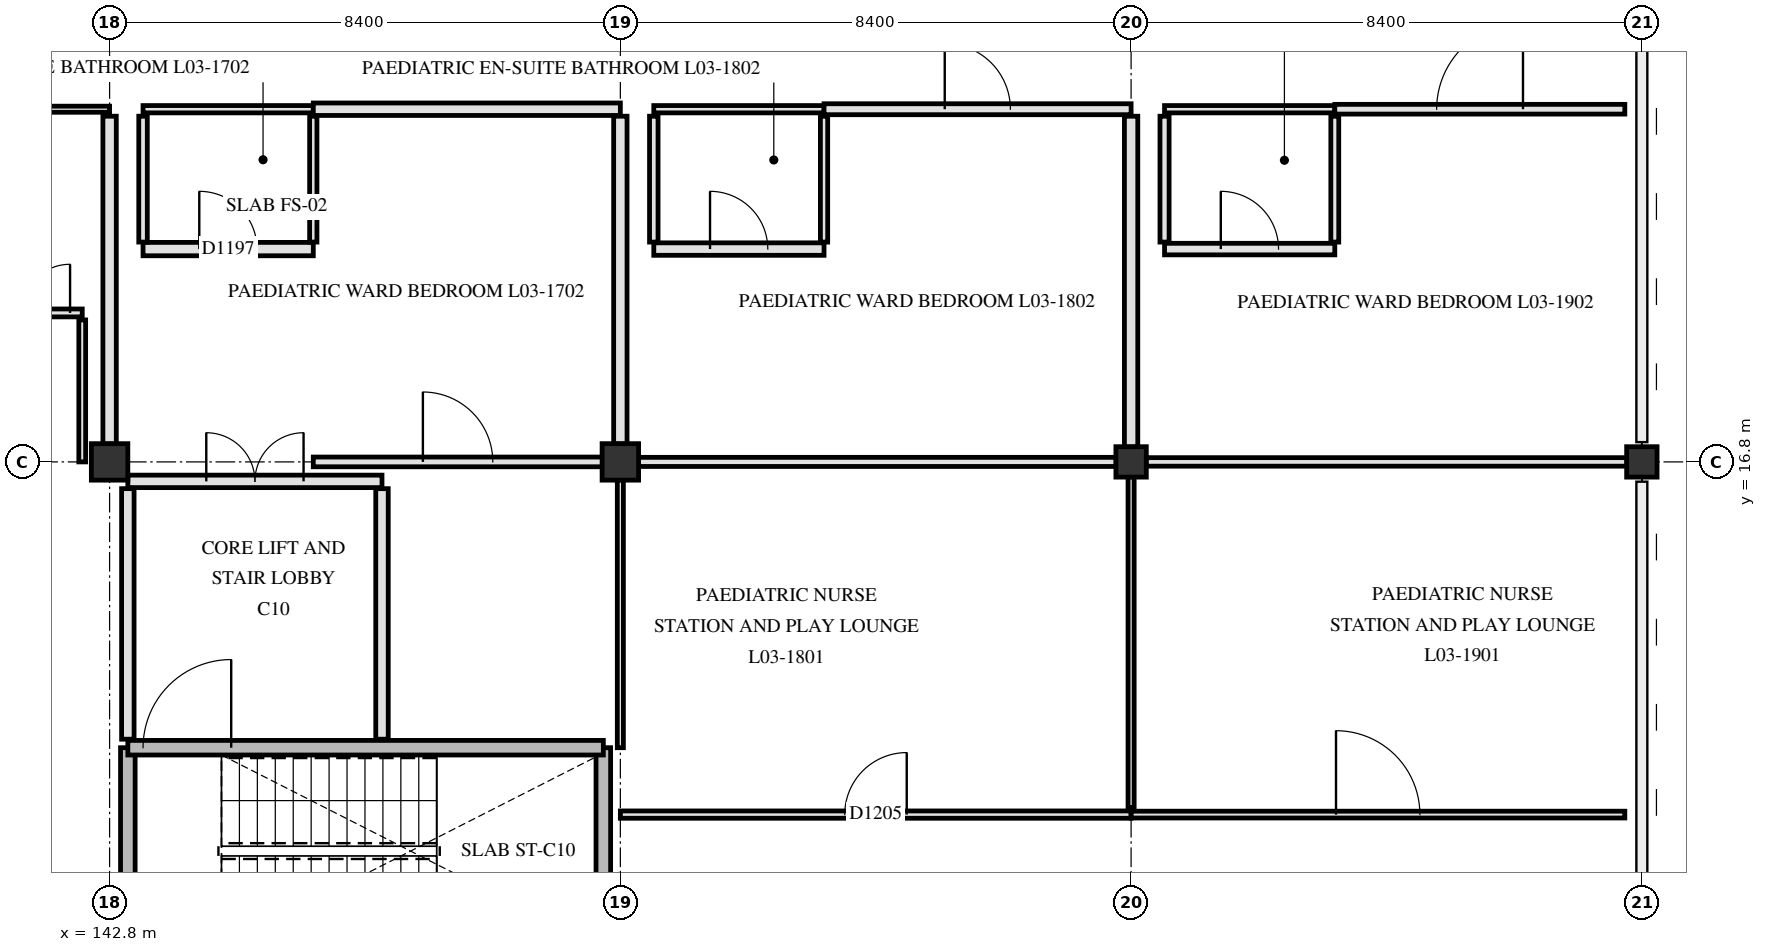
"""IFC4 building model, lengths in metres.
Left out: names, types, materials, properties, quantities, classifications, styles, units other than length and angle.
Written with IfcOpenShell. Run it as: python <this file> out.ifc"""

import sys

from ifc_helpers import new_model, si_unit, direction, frame, frame_2d, origin, origin_2d, place, context, subcontext, project, spatial, rectangle, extrude, element, fill, save


model = new_model("IFC4")
c1 = context("Model", 3, precision=1e-05, world=origin(), true_north=direction((0.0, 1.0)))
c2 = subcontext(c1, "Body", "Model", "MODEL_VIEW")
j1 = project(units=[si_unit("LENGTHUNIT", "METRE"), si_unit("PLANEANGLEUNIT", "RADIAN")], contexts=[c1])
p1 = place(None, origin())
s1 = spatial("IfcSite", under=j1, at=p1, CompositionType="ELEMENT")
p2 = place(p1, origin())
s2 = spatial("IfcBuilding", under=s1, at=p2, CompositionType="ELEMENT")
p3 = place(p2, frame((0.0, 0.0, 14.4)))
s3 = spatial("IfcBuildingStorey", under=s2, at=p3, CompositionType="ELEMENT", Elevation=14.4)
for number, where, z_axis, x_axis in (
    (1, (142.8, 16.8, 0.0), (0.0, 0.0, 1.0), (1.0, 0.0, 0.0)),
    (2, (151.2, 16.8, 0.0), (0.0, 0.0, 1.0), (1.0, 0.0, 0.0)),
):
    element("IfcColumn", number, at=place(p3, frame(where, z_axis=z_axis, x_axis=x_axis)), inside=s3, PredefinedType="COLUMN", context=c2, shape_type="SweptSolid", body=[
        extrude(rectangle(XDim=0.6, YDim=0.6, at=origin_2d()), origin(), (0.0, 0.0, 1.0), 4.2),
    ])
for number, where, z_axis, x_axis in (
    (3, (159.6, 16.8, 0.0), (0.0, 0.0, 1.0), (1.0, 0.0, 0.0)),
    (4, (168.0, 16.8, 0.0), (0.0, 0.0, 1.0), (1.0, 0.0, 0.0)),
):
    element("IfcColumn", number, at=place(p3, frame(where, z_axis=z_axis, x_axis=x_axis)), inside=s3, PredefinedType="COLUMN", context=c2, shape_type="SweptSolid", body=[
        extrude(rectangle(XDim=0.5, YDim=0.5, at=origin_2d()), origin(), (0.0, 0.0, 1.0), 4.2),
    ])
for number, where, z_axis, x_axis in (
    (5, (143.1, 8.78, 0.0), (0.0, 0.0, 1.0), (0.0, 1.0, 0.0)),
    (6, (150.92, 8.78, 0.0), (0.0, 0.0, 1.0), (0.0, 1.0, 0.0)),
):
    element("IfcWall", number, at=place(p3, frame(where, z_axis=z_axis, x_axis=x_axis)), inside=s3, PredefinedType="SHEAR", context=c2, shape_type="SweptSolid", body=[
        extrude(rectangle(XDim=3.32, YDim=0.24, at=frame_2d((1.66, 0.0))), origin(), (0.0, 0.0, 1.0), 3.9),
    ])
p4 = place(p3, frame((143.1, 12.1, 0.0), z_axis=(0.0, 0.0, 1.0), x_axis=(1.0, 0.0, 0.0)))
e7 = element("IfcWall", 7, at=p4, inside=s3, PredefinedType="SHEAR", context=c2, shape_type="SweptSolid", body=[
    extrude(rectangle(XDim=7.82, YDim=0.24, at=frame_2d((3.91, 0.0))), origin(), (0.0, 0.0, 1.0), 3.9),
])
p5 = place(p4, frame((0.25, 0.0, 0.0)))
e8 = element("IfcOpeningElement", 8, at=p5, cuts=e7, PredefinedType="OPENING", context=c2, shape_type="SweptSolid", body=[
    extrude(rectangle(XDim=1.45, YDim=2.2, at=frame_2d((0.725, 1.1))), frame((0.0, 0.13, 0.0), z_axis=(0.0, -1.0, 0.0), x_axis=(1.0, 0.0, 0.0)), (0.0, 0.0, 1.0), 0.26),
])
p6 = place(p3, frame((147.28, 12.24, 0.0), z_axis=(0.0, 0.0, 1.0), x_axis=(0.0, 1.0, 0.0)))
e9 = element("IfcWall", 9, at=p6, inside=s3, PredefinedType="PARTITIONING", context=c2, shape_type="SweptSolid", body=[
    extrude(rectangle(XDim=4.12, YDim=0.205, at=frame_2d((2.06, 0.0))), origin(), (0.0, 0.0, 1.0), 3.89),
])
p7 = place(p3, frame((143.1, 12.24, 0.0), z_axis=(0.0, 0.0, 1.0), x_axis=(0.0, 1.0, 0.0)))
e10 = element("IfcWall", 10, at=p7, inside=s3, PredefinedType="PARTITIONING", context=c2, shape_type="SweptSolid", body=[
    extrude(rectangle(XDim=4.12, YDim=0.205, at=frame_2d((2.06, 0.0))), origin(), (0.0, 0.0, 1.0), 3.34),
])
p8 = place(p3, frame((143.1, 16.48, 0.0), z_axis=(0.0, 0.0, 1.0), x_axis=(1.0, 0.0, 0.0)))
e11 = element("IfcWall", 11, at=p8, inside=s3, PredefinedType="PARTITIONING", context=c2, shape_type="SweptSolid", body=[
    extrude(rectangle(XDim=4.18, YDim=0.205, at=frame_2d((2.09, 0.0))), origin(), (0.0, 0.0, 1.0), 3.29),
])
p9 = place(p8, frame((1.29, 0.0, 0.0)))
e12 = element("IfcOpeningElement", 12, at=p9, cuts=e11, PredefinedType="OPENING", context=c2, shape_type="SweptSolid", body=[
    extrude(rectangle(XDim=1.6, YDim=2.25, at=frame_2d((0.8, 1.125))), frame((0.0, 0.113, 0.0), z_axis=(0.0, -1.0, 0.0), x_axis=(1.0, 0.0, 0.0)), (0.0, 0.0, 1.0), 0.225),
])
p10 = place(p3, frame((151.2, 11.0, 0.0), z_axis=(0.0, 0.0, 1.0), x_axis=(1.0, 0.0, 0.0)))
e13 = element("IfcWall", 13, at=p10, inside=s3, PredefinedType="PARTITIONING", context=c2, shape_type="SweptSolid", body=[
    extrude(rectangle(XDim=8.4, YDim=0.12, at=frame_2d((4.2, 0.0))), origin(), (0.0, 0.0, 1.0), 3.34),
])
p11 = place(p10, frame((3.69, 0.0, 0.0)))
e14 = element("IfcOpeningElement", 14, at=p11, cuts=e13, PredefinedType="OPENING", context=c2, shape_type="SweptSolid", body=[
    extrude(rectangle(XDim=1.02, YDim=2.12, at=frame_2d((0.51, 1.06))), frame((0.0, 0.07, 0.0), z_axis=(0.0, -1.0, 0.0), x_axis=(1.0, 0.0, 0.0)), (0.0, 0.0, 1.0), 0.14),
])
p12 = place(p3, frame((159.6, 11.0, 0.0), z_axis=(0.0, 0.0, 1.0), x_axis=(1.0, 0.0, 0.0)))
e15 = element("IfcWall", 15, at=p12, inside=s3, PredefinedType="PARTITIONING", context=c2, shape_type="SweptSolid", body=[
    extrude(rectangle(XDim=8.12, YDim=0.112, at=frame_2d((4.06, 0.0))), origin(), (0.0, 0.0, 1.0), 2.89),
])
p13 = place(p12, frame((3.37, 0.0, 0.0)))
e16 = element("IfcOpeningElement", 16, at=p13, cuts=e15, PredefinedType="OPENING", context=c2, shape_type="SweptSolid", body=[
    extrude(rectangle(XDim=1.38, YDim=2.22, at=frame_2d((0.69, 1.11))), frame((0.0, 0.066, 0.0), z_axis=(0.0, -1.0, 0.0), x_axis=(1.0, 0.0, 0.0)), (0.0, 0.0, 1.0), 0.132),
])
p14 = place(p3, frame((146.15, 16.8, 0.0), z_axis=(0.0, 0.0, 1.0), x_axis=(1.0, 0.0, 0.0)))
e17 = element("IfcWall", 17, at=p14, inside=s3, PredefinedType="PARTITIONING", context=c2, shape_type="SweptSolid", body=[
    extrude(rectangle(XDim=4.755, YDim=0.16, at=frame_2d((2.377, 0.0))), origin(), (0.0, 0.0, 1.0), 3.29),
])
p15 = place(p14, frame((1.802, 0.0, 0.0)))
e18 = element("IfcOpeningElement", 18, at=p15, cuts=e17, PredefinedType="OPENING", context=c2, shape_type="SweptSolid", body=[
    extrude(rectangle(XDim=1.15, YDim=2.15, at=frame_2d((0.575, 1.075))), frame((0.0, 0.09, 0.0), z_axis=(0.0, -1.0, 0.0), x_axis=(1.0, 0.0, 0.0)), (0.0, 0.0, 1.0), 0.18),
])
p16 = place(p3, frame((151.495, 16.8, 0.0), z_axis=(0.0, 0.0, 1.0), x_axis=(1.0, 0.0, 0.0)))
e19 = element("IfcWall", 19, at=p16, inside=s3, PredefinedType="PARTITIONING", context=c2, shape_type="SweptSolid", body=[
    extrude(rectangle(XDim=7.86, YDim=0.15, at=frame_2d((3.93, 0.0))), origin(), (0.0, 0.0, 1.0), 3.29),
])
p17 = place(p3, frame((159.845, 16.8, 0.0), z_axis=(0.0, 0.0, 1.0), x_axis=(1.0, 0.0, 0.0)))
e20 = element("IfcWall", 20, at=p17, inside=s3, PredefinedType="PARTITIONING", context=c2, shape_type="SweptSolid", body=[
    extrude(rectangle(XDim=7.91, YDim=0.14, at=frame_2d((3.955, 0.0))), origin(), (0.0, 0.0, 1.0), 3.29),
])
p18 = place(p3, frame((140.35, 19.25, 0.0), z_axis=(0.0, 0.0, 1.0), x_axis=(1.0, 0.0, 0.0)))
e21 = element("IfcWall", 21, at=p18, inside=s3, PredefinedType="PARTITIONING", context=c2, shape_type="SweptSolid", body=[
    extrude(rectangle(XDim=2.0, YDim=0.13, at=frame_2d((1.0, 0.0))), origin(), (0.0, 0.0, 1.0), 3.89),
])
p19 = place(p18, frame((0.2, 0.0, 0.0)))
e22 = element("IfcOpeningElement", 22, at=p19, cuts=e21, PredefinedType="OPENING", context=c2, shape_type="SweptSolid", body=[
    extrude(rectangle(XDim=1.6, YDim=2.25, at=frame_2d((0.8, 1.125))), frame((0.0, 0.075, 0.0), z_axis=(0.0, -1.0, 0.0), x_axis=(1.0, 0.0, 0.0)), (0.0, 0.0, 1.0), 0.15),
])
p20 = place(p3, frame((143.35, 20.3, 0.0), z_axis=(0.0, 0.0, 1.0), x_axis=(1.0, 0.0, 0.0)))
e23 = element("IfcWall", 23, at=p20, inside=s3, PredefinedType="PARTITIONING", context=c2, shape_type="SweptSolid", body=[
    extrude(rectangle(XDim=2.8, YDim=0.22, at=frame_2d((1.4, 0.0))), origin(), (0.0, 0.0, 1.0), 3.89),
])
p21 = place(p20, frame((0.925, 0.0, 0.0)))
e24 = element("IfcOpeningElement", 24, at=p21, cuts=e23, PredefinedType="OPENING", context=c2, shape_type="SweptSolid", body=[
    extrude(rectangle(XDim=0.95, YDim=2.1, at=frame_2d((0.475, 1.05))), frame((0.0, 0.12, 0.0), z_axis=(0.0, -1.0, 0.0), x_axis=(1.0, 0.0, 0.0)), (0.0, 0.0, 1.0), 0.24),
])
p22 = place(p3, frame((151.75, 20.3, 0.0), z_axis=(0.0, 0.0, 1.0), x_axis=(1.0, 0.0, 0.0)))
e25 = element("IfcWall", 25, at=p22, inside=s3, PredefinedType="PARTITIONING", context=c2, shape_type="SweptSolid", body=[
    extrude(rectangle(XDim=2.8, YDim=0.205, at=frame_2d((1.4, 0.0))), origin(), (0.0, 0.0, 1.0), 3.89),
])
p23 = place(p22, frame((0.925, 0.0, 0.0)))
e26 = element("IfcOpeningElement", 26, at=p23, cuts=e25, PredefinedType="OPENING", context=c2, shape_type="SweptSolid", body=[
    extrude(rectangle(XDim=0.95, YDim=2.1, at=frame_2d((0.475, 1.05))), frame((0.0, 0.113, 0.0), z_axis=(0.0, -1.0, 0.0), x_axis=(1.0, 0.0, 0.0)), (0.0, 0.0, 1.0), 0.225),
])
p24 = place(p3, frame((160.15, 20.3, 0.0), z_axis=(0.0, 0.0, 1.0), x_axis=(1.0, 0.0, 0.0)))
e27 = element("IfcWall", 27, at=p24, inside=s3, PredefinedType="PARTITIONING", context=c2, shape_type="SweptSolid", body=[
    extrude(rectangle(XDim=2.8, YDim=0.19, at=frame_2d((1.4, 0.0))), origin(), (0.0, 0.0, 1.0), 3.89),
])
p25 = place(p24, frame((0.925, 0.0, 0.0)))
e28 = element("IfcOpeningElement", 28, at=p25, cuts=e27, PredefinedType="OPENING", context=c2, shape_type="SweptSolid", body=[
    extrude(rectangle(XDim=0.95, YDim=2.1, at=frame_2d((0.475, 1.05))), frame((0.0, 0.105, 0.0), z_axis=(0.0, -1.0, 0.0), x_axis=(1.0, 0.0, 0.0)), (0.0, 0.0, 1.0), 0.21),
])
p26 = place(p3, frame((137.75, 22.6, 0.0), z_axis=(0.0, 0.0, 1.0), x_axis=(1.0, 0.0, 0.0)))
e29 = element("IfcWall", 29, at=p26, inside=s3, PredefinedType="PARTITIONING", context=c2, shape_type="SweptSolid", body=[
    extrude(rectangle(XDim=5.05, YDim=0.1, at=frame_2d((2.525, 0.0))), origin(), (0.0, 0.0, 1.0), 3.34),
])
p27 = place(p3, frame((143.35, 22.6, 0.0), z_axis=(0.0, 0.0, 1.0), x_axis=(1.0, 0.0, 0.0)))
e30 = element("IfcWall", 30, at=p27, inside=s3, PredefinedType="PARTITIONING", context=c2, shape_type="SweptSolid", body=[
    extrude(rectangle(XDim=2.8, YDim=0.12, at=frame_2d((1.4, 0.0))), origin(), (0.0, 0.0, 1.0), 3.89),
])
p28 = place(p3, frame((146.15, 22.6, 0.0), z_axis=(0.0, 0.0, 1.0), x_axis=(1.0, 0.0, 0.0)))
e31 = element("IfcWall", 31, at=p28, inside=s3, PredefinedType="PARTITIONING", context=c2, shape_type="SweptSolid", body=[
    extrude(rectangle(XDim=5.05, YDim=0.205, at=frame_2d((2.525, 0.0))), origin(), (0.0, 0.0, 1.0), 3.34),
])
p29 = place(p3, frame((151.75, 22.6, 0.0), z_axis=(0.0, 0.0, 1.0), x_axis=(1.0, 0.0, 0.0)))
e32 = element("IfcWall", 32, at=p29, inside=s3, PredefinedType="PARTITIONING", context=c2, shape_type="SweptSolid", body=[
    extrude(rectangle(XDim=2.8, YDim=0.12, at=frame_2d((1.4, 0.0))), origin(), (0.0, 0.0, 1.0), 3.89),
])
p30 = place(p3, frame((154.55, 22.6, 0.0), z_axis=(0.0, 0.0, 1.0), x_axis=(1.0, 0.0, 0.0)))
e33 = element("IfcWall", 33, at=p30, inside=s3, PredefinedType="PARTITIONING", context=c2, shape_type="SweptSolid", body=[
    extrude(rectangle(XDim=5.05, YDim=0.18, at=frame_2d((2.525, 0.0))), origin(), (0.0, 0.0, 1.0), 3.34),
])
p31 = place(p30, frame((1.985, 0.0, 0.0)))
e34 = element("IfcOpeningElement", 34, at=p31, cuts=e33, PredefinedType="OPENING", context=c2, shape_type="SweptSolid", body=[
    extrude(rectangle(XDim=1.08, YDim=2.12, at=frame_2d((0.54, 1.06))), frame((0.0, 0.1, 0.0), z_axis=(0.0, -1.0, 0.0), x_axis=(1.0, 0.0, 0.0)), (0.0, 0.0, 1.0), 0.2),
])
p32 = place(p3, frame((160.15, 22.6, 0.0), z_axis=(0.0, 0.0, 1.0), x_axis=(1.0, 0.0, 0.0)))
e35 = element("IfcWall", 35, at=p32, inside=s3, PredefinedType="PARTITIONING", context=c2, shape_type="SweptSolid", body=[
    extrude(rectangle(XDim=2.8, YDim=0.12, at=frame_2d((1.4, 0.0))), origin(), (0.0, 0.0, 1.0), 3.89),
])
p33 = place(p3, frame((162.95, 22.6, 0.0), z_axis=(0.0, 0.0, 1.0), x_axis=(1.0, 0.0, 0.0)))
e36 = element("IfcWall", 36, at=p33, inside=s3, PredefinedType="PARTITIONING", context=c2, shape_type="SweptSolid", body=[
    extrude(rectangle(XDim=4.77, YDim=0.16, at=frame_2d((2.385, 0.0))), origin(), (0.0, 0.0, 1.0), 2.89),
])
p34 = place(p33, frame((1.675, 0.0, 0.0)))
e37 = element("IfcOpeningElement", 37, at=p34, cuts=e36, PredefinedType="OPENING", context=c2, shape_type="SweptSolid", body=[
    extrude(rectangle(XDim=1.42, YDim=2.22, at=frame_2d((0.71, 1.11))), frame((0.0, 0.09, 0.0), z_axis=(0.0, -1.0, 0.0), x_axis=(1.0, 0.0, 0.0)), (0.0, 0.0, 1.0), 0.18),
])
p35 = place(p3, frame((142.35, 16.8, 0.0), z_axis=(0.0, 0.0, 1.0), x_axis=(0.0, 1.0, 0.0)))
e38 = element("IfcWall", 38, at=p35, inside=s3, PredefinedType="PARTITIONING", context=c2, shape_type="SweptSolid", body=[
    extrude(rectangle(XDim=2.335, YDim=0.112, at=frame_2d((1.167, 0.0))), origin(), (0.0, 0.0, 1.0), 3.29),
])
p36 = place(p3, frame((142.8, 17.095, 0.0), z_axis=(0.0, 0.0, 1.0), x_axis=(0.0, 1.0, 0.0)))
e39 = element("IfcWall", 39, at=p36, inside=s3, PredefinedType="PARTITIONING", context=c2, shape_type="SweptSolid", body=[
    extrude(rectangle(XDim=5.39, YDim=0.22, at=frame_2d((2.695, 0.0))), origin(), (0.0, 0.0, 1.0), 3.34),
])
p37 = place(p3, frame((143.35, 20.415, 0.0), z_axis=(0.0, 0.0, 1.0), x_axis=(0.0, 1.0, 0.0)))
e40 = element("IfcWall", 40, at=p37, inside=s3, PredefinedType="PARTITIONING", context=c2, shape_type="SweptSolid", body=[
    extrude(rectangle(XDim=2.07, YDim=0.14, at=frame_2d((1.035, 0.0))), origin(), (0.0, 0.0, 1.0), 3.89),
])
p38 = place(p3, frame((146.15, 20.415, 0.0), z_axis=(0.0, 0.0, 1.0), x_axis=(0.0, 1.0, 0.0)))
e41 = element("IfcWall", 41, at=p38, inside=s3, PredefinedType="PARTITIONING", context=c2, shape_type="SweptSolid", body=[
    extrude(rectangle(XDim=2.07, YDim=0.12, at=frame_2d((1.035, 0.0))), origin(), (0.0, 0.0, 1.0), 3.89),
])
p39 = place(p3, frame((151.2, 12.1, 0.0), z_axis=(0.0, 0.0, 1.0), x_axis=(0.0, 1.0, 0.0)))
e42 = element("IfcWall", 42, at=p39, inside=s3, PredefinedType="PARTITIONING", context=c2, shape_type="SweptSolid", body=[
    extrude(rectangle(XDim=4.405, YDim=0.1, at=frame_2d((2.202, 0.0))), origin(), (0.0, 0.0, 1.0), 3.34),
])
p40 = place(p3, frame((151.2, 17.095, 0.0), z_axis=(0.0, 0.0, 1.0), x_axis=(0.0, 1.0, 0.0)))
e43 = element("IfcWall", 43, at=p40, inside=s3, PredefinedType="PARTITIONING", context=c2, shape_type="SweptSolid", body=[
    extrude(rectangle(XDim=5.39, YDim=0.22, at=frame_2d((2.695, 0.0))), origin(), (0.0, 0.0, 1.0), 3.34),
])
p41 = place(p3, frame((151.75, 20.415, 0.0), z_axis=(0.0, 0.0, 1.0), x_axis=(0.0, 1.0, 0.0)))
e44 = element("IfcWall", 44, at=p41, inside=s3, PredefinedType="PARTITIONING", context=c2, shape_type="SweptSolid", body=[
    extrude(rectangle(XDim=2.07, YDim=0.14, at=frame_2d((1.035, 0.0))), origin(), (0.0, 0.0, 1.0), 3.89),
])
p42 = place(p3, frame((154.55, 20.415, 0.0), z_axis=(0.0, 0.0, 1.0), x_axis=(0.0, 1.0, 0.0)))
e45 = element("IfcWall", 45, at=p42, inside=s3, PredefinedType="PARTITIONING", context=c2, shape_type="SweptSolid", body=[
    extrude(rectangle(XDim=2.07, YDim=0.12, at=frame_2d((1.035, 0.0))), origin(), (0.0, 0.0, 1.0), 3.89),
])
p43 = place(p3, frame((159.6, 11.115, 0.0), z_axis=(0.0, 0.0, 1.0), x_axis=(0.0, 1.0, 0.0)))
e46 = element("IfcWall", 46, at=p43, inside=s3, PredefinedType="PARTITIONING", context=c2, shape_type="SweptSolid", body=[
    extrude(rectangle(XDim=5.44, YDim=0.1, at=frame_2d((2.72, 0.0))), origin(), (0.0, 0.0, 1.0), 3.34),
])
p44 = place(p3, frame((159.6, 17.045, 0.0), z_axis=(0.0, 0.0, 1.0), x_axis=(0.0, 1.0, 0.0)))
e47 = element("IfcWall", 47, at=p44, inside=s3, PredefinedType="PARTITIONING", context=c2, shape_type="SweptSolid", body=[
    extrude(rectangle(XDim=5.44, YDim=0.22, at=frame_2d((2.72, 0.0))), origin(), (0.0, 0.0, 1.0), 3.34),
])
p45 = place(p3, frame((160.15, 20.415, 0.0), z_axis=(0.0, 0.0, 1.0), x_axis=(0.0, 1.0, 0.0)))
e48 = element("IfcWall", 48, at=p45, inside=s3, PredefinedType="PARTITIONING", context=c2, shape_type="SweptSolid", body=[
    extrude(rectangle(XDim=2.07, YDim=0.15, at=frame_2d((1.035, 0.0))), origin(), (0.0, 0.0, 1.0), 3.89),
])
p46 = place(p3, frame((162.95, 20.415, 0.0), z_axis=(0.0, 0.0, 1.0), x_axis=(0.0, 1.0, 0.0)))
e49 = element("IfcWall", 49, at=p46, inside=s3, PredefinedType="PARTITIONING", context=c2, shape_type="SweptSolid", body=[
    extrude(rectangle(XDim=2.07, YDim=0.13, at=frame_2d((1.035, 0.0))), origin(), (0.0, 0.0, 1.0), 3.89),
])
p47 = place(p5, origin())
e50 = element("IfcDoor", 50, at=p47, inside=s3, OperationType="SINGLE_SWING_RIGHT", PredefinedType="DOOR", context=c2, shape_type="SweptSolid", body=[
    extrude(rectangle(XDim=1.45, YDim=2.2, at=frame_2d((0.725, 1.1))), frame((0.0, 0.025, 0.0), z_axis=(0.0, -1.0, 0.0), x_axis=(1.0, 0.0, 0.0)), (0.0, 0.0, 1.0), 0.05),
])
fill(e8, e50)
p48 = place(p9, origin())
e51 = element("IfcDoor", 51, at=p48, inside=s3, OperationType="DOUBLE_SWING_LEFT", PredefinedType="DOOR", context=c2, shape_type="SweptSolid", body=[
    extrude(rectangle(XDim=1.6, YDim=2.25, at=frame_2d((0.8, 1.125))), frame((0.0, 0.025, 0.0), z_axis=(0.0, -1.0, 0.0), x_axis=(1.0, 0.0, 0.0)), (0.0, 0.0, 1.0), 0.05),
])
fill(e12, e51)
p49 = place(p19, origin())
e52 = element("IfcDoor", 52, at=p49, inside=s3, OperationType="DOUBLE_SWING_LEFT", PredefinedType="DOOR", context=c2, shape_type="SweptSolid", body=[
    extrude(rectangle(XDim=1.6, YDim=2.25, at=frame_2d((0.8, 1.125))), frame((0.0, 0.025, 0.0), z_axis=(0.0, -1.0, 0.0), x_axis=(1.0, 0.0, 0.0)), (0.0, 0.0, 1.0), 0.05),
])
fill(e22, e52)
p50 = place(p15, origin())
e53 = element("IfcDoor", 53, at=p50, inside=s3, OperationType="SINGLE_SWING_LEFT", PredefinedType="DOOR", context=c2, shape_type="SweptSolid", body=[
    extrude(rectangle(XDim=1.15, YDim=2.15, at=frame_2d((0.575, 1.075))), frame((0.0, 0.025, 0.0), z_axis=(0.0, -1.0, 0.0), x_axis=(1.0, 0.0, 0.0)), (0.0, 0.0, 1.0), 0.05),
])
fill(e18, e53)
p51 = place(p21, origin())
e54 = element("IfcDoor", 54, at=p51, inside=s3, OperationType="SINGLE_SWING_LEFT", PredefinedType="DOOR", context=c2, shape_type="SweptSolid", body=[
    extrude(rectangle(XDim=0.95, YDim=2.1, at=frame_2d((0.475, 1.05))), frame((0.0, 0.025, 0.0), z_axis=(0.0, -1.0, 0.0), x_axis=(1.0, 0.0, 0.0)), (0.0, 0.0, 1.0), 0.05),
])
fill(e24, e54)
p52 = place(p11, origin())
e55 = element("IfcDoor", 55, at=p52, inside=s3, OperationType="SINGLE_SWING_RIGHT", PredefinedType="DOOR", context=c2, shape_type="SweptSolid", body=[
    extrude(rectangle(XDim=1.02, YDim=2.12, at=frame_2d((0.51, 1.06))), frame((0.0, 0.025, 0.0), z_axis=(0.0, -1.0, 0.0), x_axis=(1.0, 0.0, 0.0)), (0.0, 0.0, 1.0), 0.05),
])
fill(e14, e55)
p53 = place(p31, origin())
e56 = element("IfcDoor", 56, at=p53, inside=s3, OperationType="SINGLE_SWING_LEFT", PredefinedType="DOOR", context=c2, shape_type="SweptSolid", body=[
    extrude(rectangle(XDim=1.08, YDim=2.12, at=frame_2d((0.54, 1.06))), frame((0.0, 0.025, 0.0), z_axis=(0.0, -1.0, 0.0), x_axis=(1.0, 0.0, 0.0)), (0.0, 0.0, 1.0), 0.05),
])
fill(e34, e56)
p54 = place(p23, origin())
e57 = element("IfcDoor", 57, at=p54, inside=s3, OperationType="SINGLE_SWING_LEFT", PredefinedType="DOOR", context=c2, shape_type="SweptSolid", body=[
    extrude(rectangle(XDim=0.95, YDim=2.1, at=frame_2d((0.475, 1.05))), frame((0.0, 0.025, 0.0), z_axis=(0.0, -1.0, 0.0), x_axis=(1.0, 0.0, 0.0)), (0.0, 0.0, 1.0), 0.05),
])
fill(e26, e57)
p55 = place(p13, origin())
e58 = element("IfcDoor", 58, at=p55, inside=s3, OperationType="SINGLE_SWING_LEFT", PredefinedType="DOOR", context=c2, shape_type="SweptSolid", body=[
    extrude(rectangle(XDim=1.38, YDim=2.22, at=frame_2d((0.69, 1.11))), frame((0.0, 0.025, 0.0), z_axis=(0.0, -1.0, 0.0), x_axis=(1.0, 0.0, 0.0)), (0.0, 0.0, 1.0), 0.05),
])
fill(e16, e58)
p56 = place(p34, origin())
e59 = element("IfcDoor", 59, at=p56, inside=s3, OperationType="SINGLE_SWING_RIGHT", PredefinedType="DOOR", context=c2, shape_type="SweptSolid", body=[
    extrude(rectangle(XDim=1.42, YDim=2.22, at=frame_2d((0.71, 1.11))), frame((0.0, 0.025, 0.0), z_axis=(0.0, -1.0, 0.0), x_axis=(1.0, 0.0, 0.0)), (0.0, 0.0, 1.0), 0.05),
])
fill(e37, e59)
p57 = place(p25, origin())
e60 = element("IfcDoor", 60, at=p57, inside=s3, OperationType="SINGLE_SWING_LEFT", PredefinedType="DOOR", context=c2, shape_type="SweptSolid", body=[
    extrude(rectangle(XDim=0.95, YDim=2.1, at=frame_2d((0.475, 1.05))), frame((0.0, 0.025, 0.0), z_axis=(0.0, -1.0, 0.0), x_axis=(1.0, 0.0, 0.0)), (0.0, 0.0, 1.0), 0.05),
])
fill(e28, e60)
save(model, sys.argv[1])
